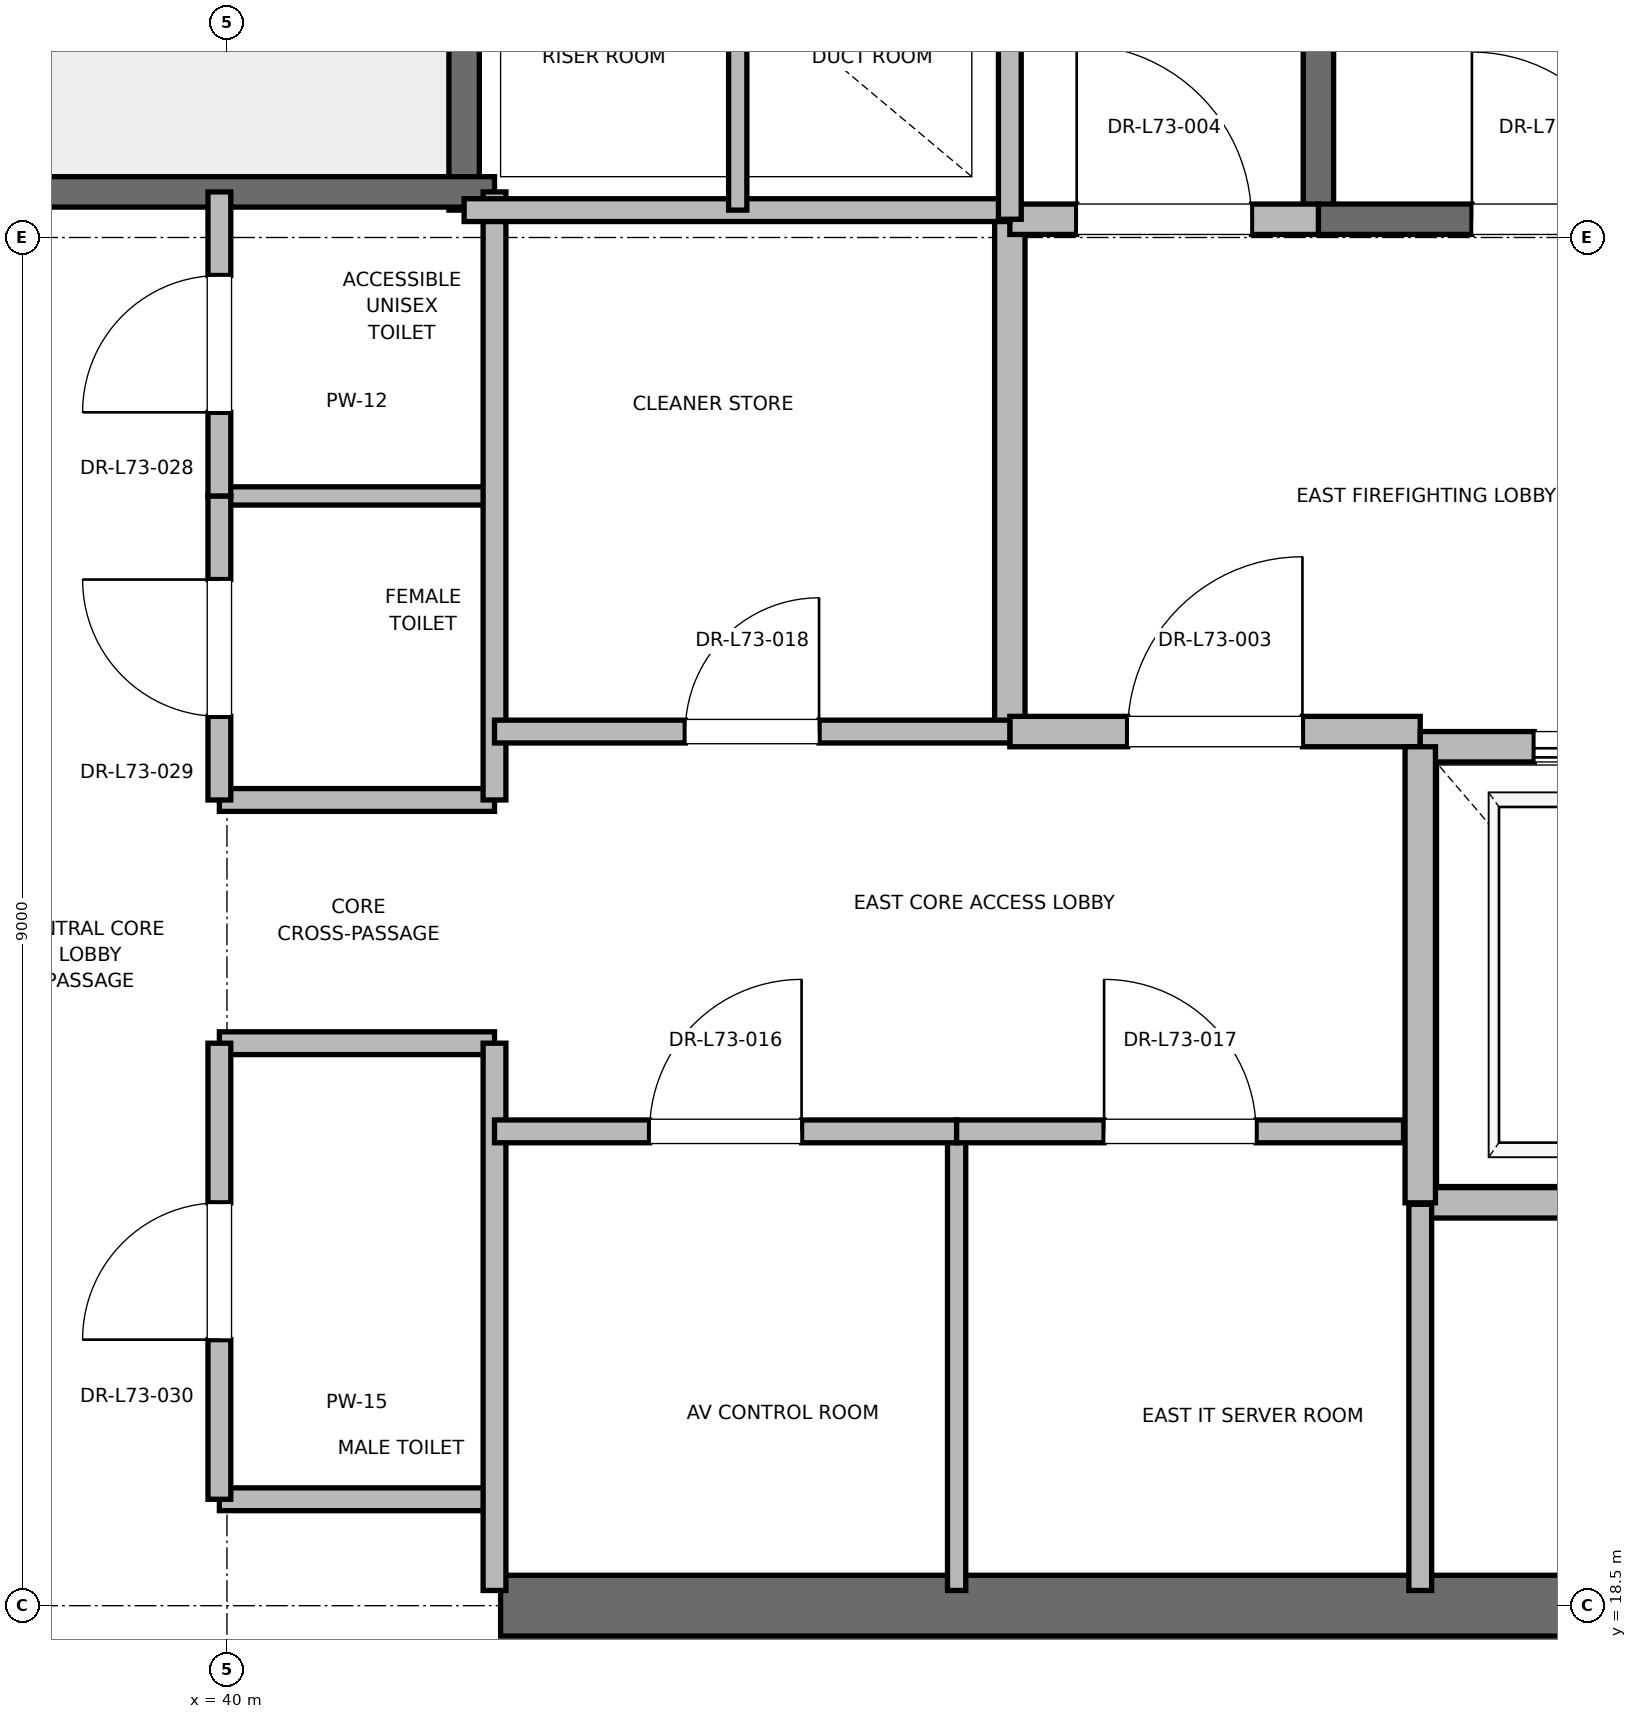
"""IFC4 building model, lengths in metres.
Left out: names, types, materials, properties, quantities, classifications, styles, units other than length and angle.
Written with IfcOpenShell. Run it as: python <this file> out.ifc"""

import sys

from ifc_helpers import new_model, si_unit, direction, frame, frame_2d, origin, place, context, subcontext, project, spatial, rectangle, extrude, element, fill, save


model = new_model("IFC4")
c1 = context("Model", 3, precision=1e-05, world=origin(), true_north=direction((0.0, 1.0)))
c2 = subcontext(c1, "Body", "Model", "MODEL_VIEW")
j1 = project(units=[si_unit("LENGTHUNIT", "METRE"), si_unit("PLANEANGLEUNIT", "RADIAN")], contexts=[c1])
p1 = place(None, origin())
s1 = spatial("IfcSite", under=j1, at=p1, CompositionType="ELEMENT")
p2 = place(p1, origin())
s2 = spatial("IfcBuilding", under=s1, at=p2, CompositionType="ELEMENT")
p3 = place(p2, frame((0.0, 0.0, 314.8)))
s3 = spatial("IfcBuildingStorey", under=s2, at=p3, CompositionType="ELEMENT", Elevation=314.8)
p4 = place(p3, frame((41.8, 18.5, 0.0), z_axis=(0.0, 0.0, 1.0), x_axis=(1.0, 0.0, 0.0)))
e1 = element("IfcWall", 1, at=p4, inside=s3, PredefinedType="SHEAR", context=c2, shape_type="SweptSolid", body=[
    extrude(rectangle(XDim=9.2, YDim=0.4, at=frame_2d((4.6, 0.0))), origin(), (0.0, 0.0, 1.0), 3.785),
])
p5 = place(p3, frame((47.18, 27.62, 0.0), z_axis=(0.0, 0.0, 1.0), x_axis=(0.0, 1.0, 0.0)))
e2 = element("IfcWall", 2, at=p5, inside=s3, PredefinedType="SOLIDWALL", context=c2, shape_type="SweptSolid", body=[
    extrude(rectangle(XDim=8.18, YDim=0.2, at=frame_2d((4.09, 0.0))), origin(), (0.0, 0.0, 1.0), 3.785),
])
p6 = place(p3, frame((47.18, 27.62, 0.0), z_axis=(0.0, 0.0, 1.0), x_axis=(1.0, 0.0, 0.0)))
e3 = element("IfcWall", 3, at=p6, inside=s3, PredefinedType="SOLIDWALL", context=c2, shape_type="SweptSolid", body=[
    extrude(rectangle(XDim=3.12, YDim=0.2, at=frame_2d((1.56, 0.0))), origin(), (0.0, 0.0, 1.0), 3.785),
])
p7 = place(p6, frame((1.01, 0.0, 0.0)))
e4 = element("IfcOpeningElement", 4, at=p7, cuts=e3, PredefinedType="OPENING", context=c2, shape_type="SweptSolid", body=[
    extrude(rectangle(XDim=1.1, YDim=2.15, at=frame_2d((0.55, 1.075))), frame((0.0, 0.1, 0.0), z_axis=(0.0, -1.0, 0.0), x_axis=(1.0, 0.0, 0.0)), (0.0, 0.0, 1.0), 0.2),
])
p8 = place(p3, frame((41.56, 27.68, 0.0), z_axis=(0.0, 0.0, 1.0), x_axis=(0.0, 1.0, 0.0)))
e5 = element("IfcWall", 5, at=p8, inside=s3, PredefinedType="SOLIDWALL", context=c2, shape_type="SweptSolid", body=[
    extrude(rectangle(XDim=8.57, YDim=0.2, at=frame_2d((4.285, 0.0))), origin(), (0.0, 0.0, 1.0), 3.785),
])
p9 = place(p3, frame((38.44, 27.8, 0.0), z_axis=(0.0, 0.0, 1.0), x_axis=(1.0, 0.0, 0.0)))
e6 = element("IfcWall", 6, at=p9, inside=s3, PredefinedType="SOLIDWALL", context=c2, shape_type="SweptSolid", body=[
    extrude(rectangle(XDim=3.32, YDim=0.2, at=frame_2d((1.66, 0.0))), origin(), (0.0, 0.0, 1.0), 3.785),
])
p10 = place(p3, frame((45.15, 24.25, 0.0), z_axis=(0.0, 0.0, 1.0), x_axis=(0.0, 1.0, 0.0)))
e7 = element("IfcWall", 7, at=p10, inside=s3, PredefinedType="PARTITIONING", context=c2, shape_type="SweptSolid", body=[
    extrude(rectangle(XDim=3.37, YDim=0.2, at=frame_2d((1.685, 0.0))), origin(), (0.0, 0.0, 1.0), 3.785),
])
p11 = place(p3, frame((45.15, 24.25, 0.0), z_axis=(0.0, 0.0, 1.0), x_axis=(1.0, 0.0, 0.0)))
e8 = element("IfcWall", 8, at=p11, inside=s3, PredefinedType="PARTITIONING", context=c2, shape_type="SweptSolid", body=[
    extrude(rectangle(XDim=2.7, YDim=0.2, at=frame_2d((1.35, 0.0))), origin(), (0.0, 0.0, 1.0), 3.785),
])
p12 = place(p11, frame((0.775, 0.0, 0.0)))
e9 = element("IfcOpeningElement", 9, at=p12, cuts=e8, PredefinedType="OPENING", context=c2, shape_type="SweptSolid", body=[
    extrude(rectangle(XDim=1.15, YDim=2.2, at=frame_2d((0.575, 1.1))), frame((0.0, 0.1, 0.0), z_axis=(0.0, -1.0, 0.0), x_axis=(1.0, 0.0, 0.0)), (0.0, 0.0, 1.0), 0.2),
])
p13 = place(p3, frame((45.15, 27.62, 0.0), z_axis=(0.0, 0.0, 1.0), x_axis=(1.0, 0.0, 0.0)))
e10 = element("IfcWall", 10, at=p13, inside=s3, PredefinedType="PARTITIONING", context=c2, shape_type="SweptSolid", body=[
    extrude(rectangle(XDim=2.03, YDim=0.2, at=frame_2d((1.015, 0.0))), origin(), (0.0, 0.0, 1.0), 3.785),
])
p14 = place(p13, frame((0.44, 0.0, 0.0)))
e11 = element("IfcOpeningElement", 11, at=p14, cuts=e10, PredefinedType="OPENING", context=c2, shape_type="SweptSolid", body=[
    extrude(rectangle(XDim=1.15, YDim=2.2, at=frame_2d((0.575, 1.1))), frame((0.0, 0.1, 0.0), z_axis=(0.0, -1.0, 0.0), x_axis=(1.0, 0.0, 0.0)), (0.0, 0.0, 1.0), 0.2),
])
p15 = place(p3, frame((47.85, 21.15, 0.0), z_axis=(0.0, 0.0, 1.0), x_axis=(1.0, 0.0, 0.0)))
e12 = element("IfcWall", 12, at=p15, inside=s3, PredefinedType="SOLIDWALL", context=c2, shape_type="SweptSolid", body=[
    extrude(rectangle(XDim=2.6, YDim=0.2, at=frame_2d((1.3, 0.0))), origin(), (0.0, 0.0, 1.0), 3.785),
])
p16 = place(p3, frame((50.45, 24.15, 0.0), z_axis=(0.0, 0.0, 1.0), x_axis=(-1.0, 0.0, 0.0)))
e13 = element("IfcWall", 13, at=p16, inside=s3, PredefinedType="SOLIDWALL", context=c2, shape_type="SweptSolid", body=[
    extrude(rectangle(XDim=2.6, YDim=0.2, at=frame_2d((1.3, 0.0))), origin(), (0.0, 0.0, 1.0), 2.865),
])
p17 = place(p16, frame((0.75, 0.0, 0.0)))
e14 = element("IfcOpeningElement", 14, at=p17, cuts=e13, PredefinedType="OPENING", context=c2, shape_type="SweptSolid", body=[
    extrude(rectangle(XDim=1.1, YDim=2.2, at=frame_2d((0.55, 1.1))), frame((0.0, 0.1, 0.0), z_axis=(0.0, -1.0, 0.0), x_axis=(1.0, 0.0, 0.0)), (0.0, 0.0, 1.0), 0.2),
])
p18 = place(p3, frame((47.85, 24.15, 0.0), z_axis=(0.0, 0.0, 1.0), x_axis=(0.0, -1.0, 0.0)))
e15 = element("IfcWall", 15, at=p18, inside=s3, PredefinedType="SOLIDWALL", context=c2, shape_type="SweptSolid", body=[
    extrude(rectangle(XDim=3.0, YDim=0.2, at=frame_2d((1.5, 0.0))), origin(), (0.0, 0.0, 1.0), 3.785),
])
for number, where, z_axis, x_axis in (
    (16, (39.95, 19.2, 0.0), (0.0, 0.0, 1.0), (1.0, 0.0, 0.0)),
    (17, (39.95, 22.2, 0.0), (0.0, 0.0, 1.0), (1.0, 0.0, 0.0)),
    (18, (39.95, 23.8, 0.0), (0.0, 0.0, 1.0), (1.0, 0.0, 0.0)),
):
    element("IfcWall", number, at=place(p3, frame(where, z_axis=z_axis, x_axis=x_axis)), inside=s3, PredefinedType="PARTITIONING", context=c2, shape_type="SweptSolid", body=[
        extrude(rectangle(XDim=1.81, YDim=0.15, at=frame_2d((0.905, 0.0))), origin(), (0.0, 0.0, 1.0), 2.85),
    ])
p19 = place(p3, frame((39.95, 25.8, 0.0), z_axis=(0.0, 0.0, 1.0), x_axis=(1.0, 0.0, 0.0)))
e19 = element("IfcWall", 19, at=p19, inside=s3, PredefinedType="PARTITIONING", context=c2, shape_type="SweptSolid", body=[
    extrude(rectangle(XDim=1.81, YDim=0.12, at=frame_2d((0.905, 0.0))), origin(), (0.0, 0.0, 1.0), 2.85),
])
p20 = place(p3, frame((41.76, 18.6, 0.0), z_axis=(0.0, 0.0, 1.0), x_axis=(0.0, 1.0, 0.0)))
e20 = element("IfcWall", 20, at=p20, inside=s3, PredefinedType="PARTITIONING", context=c2, shape_type="SweptSolid", body=[
    extrude(rectangle(XDim=3.6, YDim=0.15, at=frame_2d((1.8, 0.0))), origin(), (0.0, 0.0, 1.0), 2.85),
])
p21 = place(p3, frame((41.76, 23.8, 0.0), z_axis=(0.0, 0.0, 1.0), x_axis=(0.0, 1.0, 0.0)))
e21 = element("IfcWall", 21, at=p21, inside=s3, PredefinedType="PARTITIONING", context=c2, shape_type="SweptSolid", body=[
    extrude(rectangle(XDim=4.0, YDim=0.15, at=frame_2d((2.0, 0.0))), origin(), (0.0, 0.0, 1.0), 2.85),
])
p22 = place(p3, frame((39.95, 19.2, 0.0), z_axis=(0.0, 0.0, 1.0), x_axis=(0.0, 1.0, 0.0)))
e22 = element("IfcWall", 22, at=p22, inside=s3, PredefinedType="PARTITIONING", context=c2, shape_type="SweptSolid", body=[
    extrude(rectangle(XDim=3.0, YDim=0.15, at=frame_2d((1.5, 0.0))), origin(), (0.0, 0.0, 1.0), 2.85),
])
p23 = place(p22, frame((1.05, 0.0, 0.0)))
e23 = element("IfcOpeningElement", 23, at=p23, cuts=e22, PredefinedType="OPENING", context=c2, shape_type="SweptSolid", body=[
    extrude(rectangle(XDim=0.9, YDim=2.1, at=frame_2d((0.45, 1.05))), frame((0.0, 0.075, 0.0), z_axis=(0.0, -1.0, 0.0), x_axis=(1.0, 0.0, 0.0)), (0.0, 0.0, 1.0), 0.15),
])
p24 = place(p3, frame((39.95, 23.8, 0.0), z_axis=(0.0, 0.0, 1.0), x_axis=(0.0, 1.0, 0.0)))
e24 = element("IfcWall", 24, at=p24, inside=s3, PredefinedType="PARTITIONING", context=c2, shape_type="SweptSolid", body=[
    extrude(rectangle(XDim=2.0, YDim=0.15, at=frame_2d((1.0, 0.0))), origin(), (0.0, 0.0, 1.0), 2.85),
])
p25 = place(p24, frame((0.55, 0.0, 0.0)))
e25 = element("IfcOpeningElement", 25, at=p25, cuts=e24, PredefinedType="OPENING", context=c2, shape_type="SweptSolid", body=[
    extrude(rectangle(XDim=0.9, YDim=2.1, at=frame_2d((0.45, 1.05))), frame((0.0, 0.075, 0.0), z_axis=(0.0, -1.0, 0.0), x_axis=(1.0, 0.0, 0.0)), (0.0, 0.0, 1.0), 0.15),
])
p26 = place(p3, frame((39.95, 25.8, 0.0), z_axis=(0.0, 0.0, 1.0), x_axis=(0.0, 1.0, 0.0)))
e26 = element("IfcWall", 26, at=p26, inside=s3, PredefinedType="PARTITIONING", context=c2, shape_type="SweptSolid", body=[
    extrude(rectangle(XDim=2.0, YDim=0.15, at=frame_2d((1.0, 0.0))), origin(), (0.0, 0.0, 1.0), 2.85),
])
p27 = place(p26, frame((0.55, 0.0, 0.0)))
e27 = element("IfcOpeningElement", 27, at=p27, cuts=e26, PredefinedType="OPENING", context=c2, shape_type="SweptSolid", body=[
    extrude(rectangle(XDim=0.9, YDim=2.1, at=frame_2d((0.45, 1.05))), frame((0.0, 0.075, 0.0), z_axis=(0.0, -1.0, 0.0), x_axis=(1.0, 0.0, 0.0)), (0.0, 0.0, 1.0), 0.15),
])
p28 = place(p3, frame((41.56, 27.68, 0.0), z_axis=(0.0, 0.0, 1.0), x_axis=(1.0, 0.0, 0.0)))
e28 = element("IfcWall", 28, at=p28, inside=s3, PredefinedType="PARTITIONING", context=c2, shape_type="SweptSolid", body=[
    extrude(rectangle(XDim=3.59, YDim=0.15, at=frame_2d((1.795, 0.0))), origin(), (0.0, 0.0, 1.0), 2.85),
])
p29 = place(p3, frame((47.85, 18.6, 0.0), z_axis=(0.0, 0.0, 1.0), x_axis=(0.0, 1.0, 0.0)))
e29 = element("IfcWall", 29, at=p29, inside=s3, PredefinedType="PARTITIONING", context=c2, shape_type="SweptSolid", body=[
    extrude(rectangle(XDim=2.54, YDim=0.15, at=frame_2d((1.27, 0.0))), origin(), (0.0, 0.0, 1.0), 2.85),
])
p30 = place(p3, frame((44.8, 18.6, 0.0), z_axis=(0.0, 0.0, 1.0), x_axis=(0.0, 1.0, 0.0)))
e30 = element("IfcWall", 30, at=p30, inside=s3, PredefinedType="PARTITIONING", context=c2, shape_type="SweptSolid", body=[
    extrude(rectangle(XDim=3.02, YDim=0.12, at=frame_2d((1.51, 0.0))), origin(), (0.0, 0.0, 1.0), 2.85),
])
p31 = place(p3, frame((41.76, 21.62, 0.0), z_axis=(0.0, 0.0, 1.0), x_axis=(1.0, 0.0, 0.0)))
e31 = element("IfcWall", 31, at=p31, inside=s3, PredefinedType="PARTITIONING", context=c2, shape_type="SweptSolid", body=[
    extrude(rectangle(XDim=3.04, YDim=0.15, at=frame_2d((1.52, 0.0))), origin(), (0.0, 0.0, 1.0), 2.85),
])
p32 = place(p31, frame((1.02, 0.0, 0.0)))
e32 = element("IfcOpeningElement", 32, at=p32, cuts=e31, PredefinedType="OPENING", context=c2, shape_type="SweptSolid", body=[
    extrude(rectangle(XDim=1.0, YDim=2.15, at=frame_2d((0.5, 1.075))), frame((0.0, 0.075, 0.0), z_axis=(0.0, -1.0, 0.0), x_axis=(1.0, 0.0, 0.0)), (0.0, 0.0, 1.0), 0.15),
])
p33 = place(p3, frame((44.8, 21.62, 0.0), z_axis=(0.0, 0.0, 1.0), x_axis=(1.0, 0.0, 0.0)))
e33 = element("IfcWall", 33, at=p33, inside=s3, PredefinedType="PARTITIONING", context=c2, shape_type="SweptSolid", body=[
    extrude(rectangle(XDim=2.94, YDim=0.15, at=frame_2d((1.47, 0.0))), origin(), (0.0, 0.0, 1.0), 2.85),
])
p34 = place(p33, frame((0.97, 0.0, 0.0)))
e34 = element("IfcOpeningElement", 34, at=p34, cuts=e33, PredefinedType="OPENING", context=c2, shape_type="SweptSolid", body=[
    extrude(rectangle(XDim=1.0, YDim=2.15, at=frame_2d((0.5, 1.075))), frame((0.0, 0.075, 0.0), z_axis=(0.0, -1.0, 0.0), x_axis=(1.0, 0.0, 0.0)), (0.0, 0.0, 1.0), 0.15),
])
p35 = place(p3, frame((41.76, 24.25, 0.0), z_axis=(0.0, 0.0, 1.0), x_axis=(1.0, 0.0, 0.0)))
e35 = element("IfcWall", 35, at=p35, inside=s3, PredefinedType="PARTITIONING", context=c2, shape_type="SweptSolid", body=[
    extrude(rectangle(XDim=3.39, YDim=0.15, at=frame_2d((1.695, 0.0))), origin(), (0.0, 0.0, 1.0), 2.85),
])
p36 = place(p35, frame((1.255, 0.0, 0.0)))
e36 = element("IfcOpeningElement", 36, at=p36, cuts=e35, PredefinedType="OPENING", context=c2, shape_type="SweptSolid", body=[
    extrude(rectangle(XDim=0.88, YDim=2.1, at=frame_2d((0.44, 1.05))), frame((0.0, 0.075, 0.0), z_axis=(0.0, -1.0, 0.0), x_axis=(1.0, 0.0, 0.0)), (0.0, 0.0, 1.0), 0.15),
])
p37 = place(p3, frame((45.15, 27.62, 0.0), z_axis=(0.0, 0.0, 1.0), x_axis=(0.0, 1.0, 0.0)))
e37 = element("IfcWall", 37, at=p37, inside=s3, PredefinedType="PARTITIONING", context=c2, shape_type="SweptSolid", body=[
    extrude(rectangle(XDim=3.1, YDim=0.15, at=frame_2d((1.55, 0.0))), origin(), (0.0, 0.0, 1.0), 2.85),
])
p38 = place(p3, frame((43.36, 27.68, 0.0), z_axis=(0.0, 0.0, 1.0), x_axis=(0.0, 1.0, 0.0)))
e38 = element("IfcWall", 38, at=p38, inside=s3, PredefinedType="PARTITIONING", context=c2, shape_type="SweptSolid", body=[
    extrude(rectangle(XDim=3.04, YDim=0.12, at=frame_2d((1.52, 0.0))), origin(), (0.0, 0.0, 1.0), 2.85),
])
p39 = place(p7, origin())
e39 = element("IfcDoor", 39, at=p39, inside=s3, OperationType="SINGLE_SWING_LEFT", PredefinedType="DOOR", context=c2, shape_type="SweptSolid", body=[
    extrude(rectangle(XDim=1.1, YDim=2.15, at=frame_2d((0.55, 1.075))), frame((0.0, 0.025, 0.0), z_axis=(0.0, -1.0, 0.0), x_axis=(1.0, 0.0, 0.0)), (0.0, 0.0, 1.0), 0.05),
])
fill(e4, e39)
p40 = place(p12, origin())
e40 = element("IfcDoor", 40, at=p40, inside=s3, OperationType="SINGLE_SWING_RIGHT", PredefinedType="DOOR", context=c2, shape_type="SweptSolid", body=[
    extrude(rectangle(XDim=1.15, YDim=2.2, at=frame_2d((0.575, 1.1))), frame((0.0, 0.025, 0.0), z_axis=(0.0, -1.0, 0.0), x_axis=(1.0, 0.0, 0.0)), (0.0, 0.0, 1.0), 0.05),
])
fill(e9, e40)
p41 = place(p14, origin())
e41 = element("IfcDoor", 41, at=p41, inside=s3, OperationType="SINGLE_SWING_LEFT", PredefinedType="DOOR", context=c2, shape_type="SweptSolid", body=[
    extrude(rectangle(XDim=1.15, YDim=2.2, at=frame_2d((0.575, 1.1))), frame((0.0, 0.025, 0.0), z_axis=(0.0, -1.0, 0.0), x_axis=(1.0, 0.0, 0.0)), (0.0, 0.0, 1.0), 0.05),
])
fill(e11, e41)
p42 = place(p17, origin())
e42 = element("IfcDoor", 42, at=p42, inside=s3, OperationType="SLIDING_TO_RIGHT", PredefinedType="DOOR", context=c2, shape_type="SweptSolid", body=[
    extrude(rectangle(XDim=1.1, YDim=2.2, at=frame_2d((0.55, 1.1))), frame((0.0, 0.025, 0.0), z_axis=(0.0, -1.0, 0.0), x_axis=(1.0, 0.0, 0.0)), (0.0, 0.0, 1.0), 0.05),
])
fill(e14, e42)
p43 = place(p23, origin())
e43 = element("IfcDoor", 43, at=p43, inside=s3, OperationType="SINGLE_SWING_LEFT", PredefinedType="DOOR", context=c2, shape_type="SweptSolid", body=[
    extrude(rectangle(XDim=0.9, YDim=2.1, at=frame_2d((0.45, 1.05))), frame((0.0, 0.025, 0.0), z_axis=(0.0, -1.0, 0.0), x_axis=(1.0, 0.0, 0.0)), (0.0, 0.0, 1.0), 0.05),
])
fill(e23, e43)
p44 = place(p25, origin())
e44 = element("IfcDoor", 44, at=p44, inside=s3, OperationType="SINGLE_SWING_RIGHT", PredefinedType="DOOR", context=c2, shape_type="SweptSolid", body=[
    extrude(rectangle(XDim=0.9, YDim=2.1, at=frame_2d((0.45, 1.05))), frame((0.0, 0.025, 0.0), z_axis=(0.0, -1.0, 0.0), x_axis=(1.0, 0.0, 0.0)), (0.0, 0.0, 1.0), 0.05),
])
fill(e25, e44)
p45 = place(p27, origin())
e45 = element("IfcDoor", 45, at=p45, inside=s3, OperationType="SINGLE_SWING_LEFT", PredefinedType="DOOR", context=c2, shape_type="SweptSolid", body=[
    extrude(rectangle(XDim=0.9, YDim=2.1, at=frame_2d((0.45, 1.05))), frame((0.0, 0.025, 0.0), z_axis=(0.0, -1.0, 0.0), x_axis=(1.0, 0.0, 0.0)), (0.0, 0.0, 1.0), 0.05),
])
fill(e27, e45)
p46 = place(p32, origin())
e46 = element("IfcDoor", 46, at=p46, inside=s3, OperationType="SINGLE_SWING_RIGHT", PredefinedType="DOOR", context=c2, shape_type="SweptSolid", body=[
    extrude(rectangle(XDim=1.0, YDim=2.15, at=frame_2d((0.5, 1.075))), frame((0.0, 0.025, 0.0), z_axis=(0.0, -1.0, 0.0), x_axis=(1.0, 0.0, 0.0)), (0.0, 0.0, 1.0), 0.05),
])
fill(e32, e46)
p47 = place(p34, origin())
e47 = element("IfcDoor", 47, at=p47, inside=s3, OperationType="SINGLE_SWING_LEFT", PredefinedType="DOOR", context=c2, shape_type="SweptSolid", body=[
    extrude(rectangle(XDim=1.0, YDim=2.15, at=frame_2d((0.5, 1.075))), frame((0.0, 0.025, 0.0), z_axis=(0.0, -1.0, 0.0), x_axis=(1.0, 0.0, 0.0)), (0.0, 0.0, 1.0), 0.05),
])
fill(e34, e47)
p48 = place(p36, origin())
e48 = element("IfcDoor", 48, at=p48, inside=s3, OperationType="SINGLE_SWING_RIGHT", PredefinedType="DOOR", context=c2, shape_type="SweptSolid", body=[
    extrude(rectangle(XDim=0.88, YDim=2.1, at=frame_2d((0.44, 1.05))), frame((0.0, 0.025, 0.0), z_axis=(0.0, -1.0, 0.0), x_axis=(1.0, 0.0, 0.0)), (0.0, 0.0, 1.0), 0.05),
])
fill(e36, e48)
save(model, sys.argv[1])
